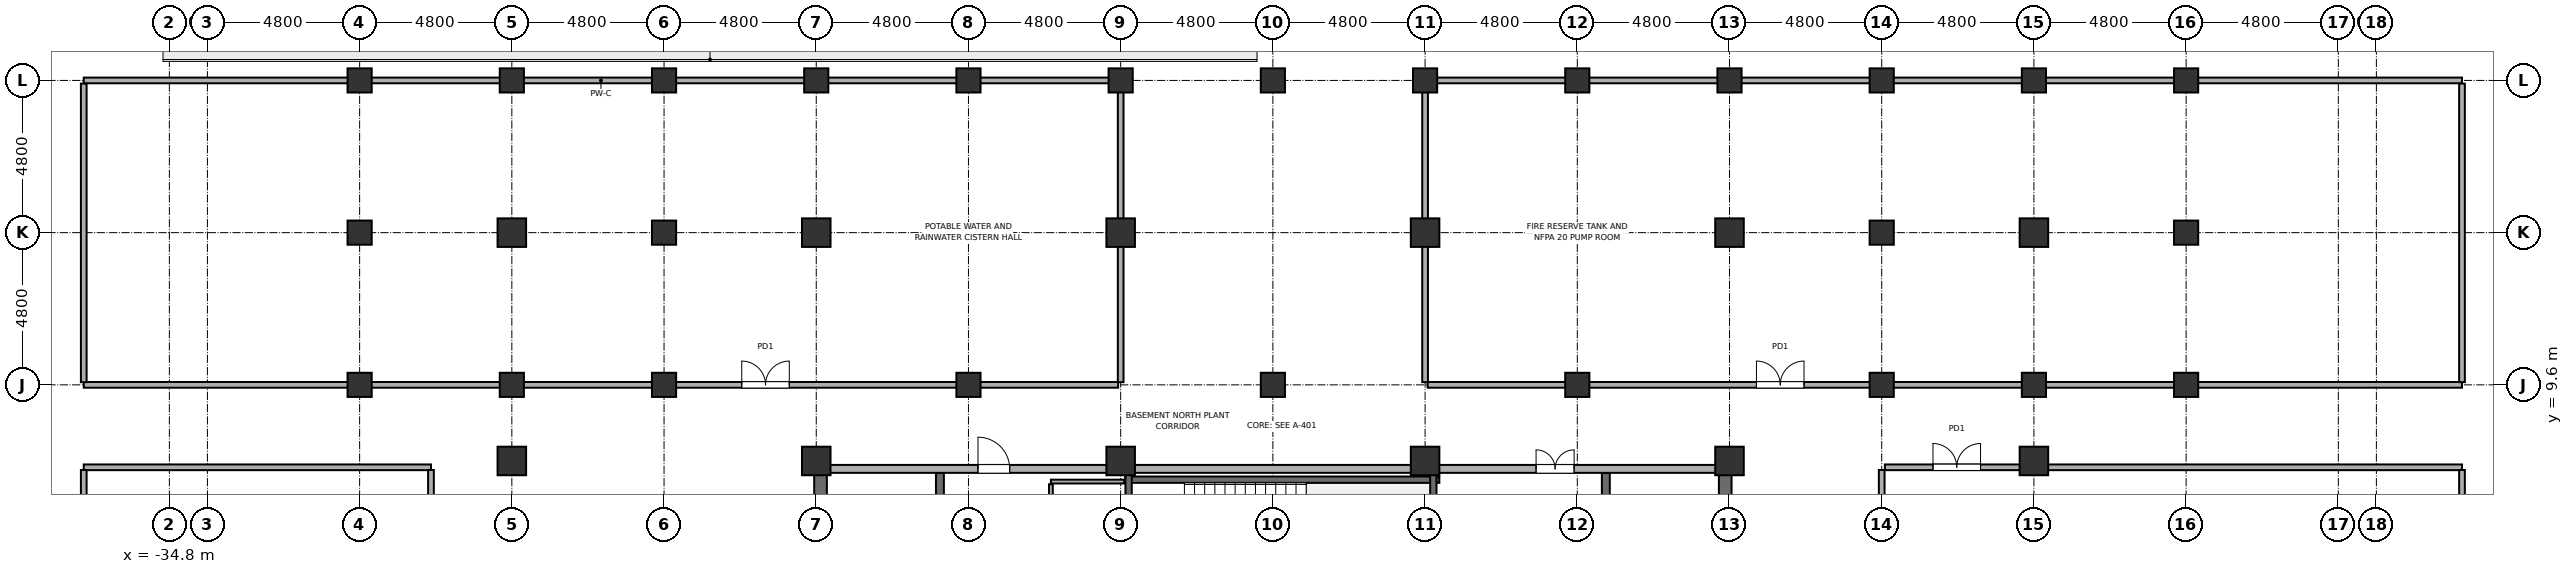
"""IFC4 building model, lengths in metres.
Left out: names, types, materials, properties, quantities, classifications, styles, units other than length and angle.
Written with IfcOpenShell. Run it as: python <this file> out.ifc"""

import sys

from ifc_helpers import new_model, si_unit, direction, frame, frame_2d, origin, origin_2d, place, context, subcontext, project, spatial, rectangle, hollow_rectangle, hollow_circle, extrude, element, fill, save


model = new_model("IFC4")
c1 = context("Model", 3, precision=1e-05, world=origin(), true_north=direction((0.0, 1.0)))
c2 = subcontext(c1, "Body", "Model", "MODEL_VIEW")
j1 = project(units=[si_unit("LENGTHUNIT", "METRE"), si_unit("PLANEANGLEUNIT", "RADIAN")], contexts=[c1])
p1 = place(None, origin())
s1 = spatial("IfcSite", under=j1, at=p1, CompositionType="ELEMENT")
p2 = place(p1, origin())
s2 = spatial("IfcBuilding", under=s1, at=p2, CompositionType="ELEMENT")
p3 = place(p2, frame((0.0, 0.0, -10.2)))
s3 = spatial("IfcBuildingStorey", under=s2, at=p3, CompositionType="ELEMENT", Elevation=-10.2)
for number, where, z_axis, x_axis in (
    (1, (-28.8, 9.6, -0.25), (0.0, 0.0, 1.0), (1.0, 0.0, 0.0)),
    (2, (-28.8, 14.4, -0.25), (0.0, 0.0, 1.0), (1.0, 0.0, 0.0)),
    (3, (-28.8, 19.2, -0.25), (0.0, 0.0, 1.0), (1.0, 0.0, 0.0)),
):
    element("IfcColumn", number, at=place(p3, frame(where, z_axis=z_axis, x_axis=x_axis)), inside=s3, PredefinedType="COLUMN", context=c2, shape_type="SweptSolid", body=[
        extrude(hollow_circle(Radius=0.381, WallThickness=0.032, at=origin_2d()), origin(), (0.0, 0.0, 1.0), 5.05),
    ])
p4 = place(p3, frame((-24.0, 7.2, -0.25), z_axis=(0.0, 0.0, 1.0), x_axis=(1.0, 0.0, 0.0)))
e4 = element("IfcColumn", 4, at=p4, inside=s3, PredefinedType="COLUMN", context=c2, shape_type="SweptSolid", body=[
    extrude(hollow_rectangle(XDim=0.9, YDim=0.9, WallThickness=0.04, at=origin_2d()), origin(), (0.0, 0.0, 1.0), 5.05),
])
p5 = place(p3, frame((-24.0, 9.6, -0.25), z_axis=(0.0, 0.0, 1.0), x_axis=(1.0, 0.0, 0.0)))
e5 = element("IfcColumn", 5, at=p5, inside=s3, PredefinedType="COLUMN", context=c2, shape_type="SweptSolid", body=[
    extrude(hollow_circle(Radius=0.381, WallThickness=0.032, at=origin_2d()), origin(), (0.0, 0.0, 1.0), 5.05),
])
p6 = place(p3, frame((-24.0, 14.4, -0.25), z_axis=(0.0, 0.0, 1.0), x_axis=(1.0, 0.0, 0.0)))
e6 = element("IfcColumn", 6, at=p6, inside=s3, PredefinedType="COLUMN", context=c2, shape_type="SweptSolid", body=[
    extrude(hollow_rectangle(XDim=0.9, YDim=0.9, WallThickness=0.04, at=origin_2d()), origin(), (0.0, 0.0, 1.0), 5.05),
])
for number, where, z_axis, x_axis in (
    (7, (-24.0, 19.2, -0.25), (0.0, 0.0, 1.0), (1.0, 0.0, 0.0)),
    (8, (-19.2, 9.6, -0.25), (0.0, 0.0, 1.0), (1.0, 0.0, 0.0)),
    (9, (-19.2, 14.4, -0.25), (0.0, 0.0, 1.0), (1.0, 0.0, 0.0)),
    (10, (-19.2, 19.2, -0.25), (0.0, 0.0, 1.0), (1.0, 0.0, 0.0)),
):
    element("IfcColumn", number, at=place(p3, frame(where, z_axis=z_axis, x_axis=x_axis)), inside=s3, PredefinedType="COLUMN", context=c2, shape_type="SweptSolid", body=[
        extrude(hollow_circle(Radius=0.381, WallThickness=0.032, at=origin_2d()), origin(), (0.0, 0.0, 1.0), 5.05),
    ])
for number, where, z_axis, x_axis in (
    (11, (-14.4, 7.2, -0.25), (0.0, 0.0, 1.0), (1.0, 0.0, 0.0)),
    (12, (-14.4, 14.4, -0.25), (0.0, 0.0, 1.0), (1.0, 0.0, 0.0)),
):
    element("IfcColumn", number, at=place(p3, frame(where, z_axis=z_axis, x_axis=x_axis)), inside=s3, PredefinedType="COLUMN", context=c2, shape_type="SweptSolid", body=[
        extrude(hollow_rectangle(XDim=0.9, YDim=0.9, WallThickness=0.04, at=origin_2d()), origin(), (0.0, 0.0, 1.0), 5.05),
    ])
for number, where, z_axis, x_axis in (
    (13, (-14.4, 19.2, -0.25), (0.0, 0.0, 1.0), (1.0, 0.0, 0.0)),
    (14, (-9.6, 9.6, -0.25), (0.0, 0.0, 1.0), (1.0, 0.0, 0.0)),
    (15, (-9.6, 19.2, -0.25), (0.0, 0.0, 1.0), (1.0, 0.0, 0.0)),
):
    element("IfcColumn", number, at=place(p3, frame(where, z_axis=z_axis, x_axis=x_axis)), inside=s3, PredefinedType="COLUMN", context=c2, shape_type="SweptSolid", body=[
        extrude(hollow_circle(Radius=0.381, WallThickness=0.032, at=origin_2d()), origin(), (0.0, 0.0, 1.0), 5.05),
    ])
for number, where, z_axis, x_axis in (
    (16, (-4.8, 7.2, -0.25), (0.0, 0.0, 1.0), (1.0, 0.0, 0.0)),
    (17, (-4.8, 14.4, -0.25), (0.0, 0.0, 1.0), (1.0, 0.0, 0.0)),
):
    element("IfcColumn", number, at=place(p3, frame(where, z_axis=z_axis, x_axis=x_axis)), inside=s3, PredefinedType="COLUMN", context=c2, shape_type="SweptSolid", body=[
        extrude(hollow_rectangle(XDim=0.9, YDim=0.9, WallThickness=0.04, at=origin_2d()), origin(), (0.0, 0.0, 1.0), 5.05),
    ])
for number, where, z_axis, x_axis in (
    (18, (-4.8, 19.2, -0.25), (0.0, 0.0, 1.0), (1.0, 0.0, 0.0)),
    (19, (0.0, 9.6, -0.25), (0.0, 0.0, 1.0), (1.0, 0.0, 0.0)),
    (20, (0.0, 19.2, -0.25), (0.0, 0.0, 1.0), (1.0, 0.0, 0.0)),
):
    element("IfcColumn", number, at=place(p3, frame(where, z_axis=z_axis, x_axis=x_axis)), inside=s3, PredefinedType="COLUMN", context=c2, shape_type="SweptSolid", body=[
        extrude(hollow_circle(Radius=0.381, WallThickness=0.032, at=origin_2d()), origin(), (0.0, 0.0, 1.0), 5.05),
    ])
for number, where, z_axis, x_axis in (
    (21, (4.8, 7.2, -0.25), (0.0, 0.0, 1.0), (1.0, 0.0, 0.0)),
    (22, (4.8, 14.4, -0.25), (0.0, 0.0, 1.0), (1.0, 0.0, 0.0)),
):
    element("IfcColumn", number, at=place(p3, frame(where, z_axis=z_axis, x_axis=x_axis)), inside=s3, PredefinedType="COLUMN", context=c2, shape_type="SweptSolid", body=[
        extrude(hollow_rectangle(XDim=0.9, YDim=0.9, WallThickness=0.04, at=origin_2d()), origin(), (0.0, 0.0, 1.0), 5.05),
    ])
for number, where, z_axis, x_axis in (
    (23, (4.8, 19.2, -0.25), (0.0, 0.0, 1.0), (1.0, 0.0, 0.0)),
    (24, (9.6, 9.6, -0.25), (0.0, 0.0, 1.0), (1.0, 0.0, 0.0)),
    (25, (9.6, 19.2, -0.25), (0.0, 0.0, 1.0), (1.0, 0.0, 0.0)),
):
    element("IfcColumn", number, at=place(p3, frame(where, z_axis=z_axis, x_axis=x_axis)), inside=s3, PredefinedType="COLUMN", context=c2, shape_type="SweptSolid", body=[
        extrude(hollow_circle(Radius=0.381, WallThickness=0.032, at=origin_2d()), origin(), (0.0, 0.0, 1.0), 5.05),
    ])
for number, where, z_axis, x_axis in (
    (26, (14.4, 7.2, -0.25), (0.0, 0.0, 1.0), (1.0, 0.0, 0.0)),
    (27, (14.4, 14.4, -0.25), (0.0, 0.0, 1.0), (1.0, 0.0, 0.0)),
):
    element("IfcColumn", number, at=place(p3, frame(where, z_axis=z_axis, x_axis=x_axis)), inside=s3, PredefinedType="COLUMN", context=c2, shape_type="SweptSolid", body=[
        extrude(hollow_rectangle(XDim=0.9, YDim=0.9, WallThickness=0.04, at=origin_2d()), origin(), (0.0, 0.0, 1.0), 5.05),
    ])
for number, where, z_axis, x_axis in (
    (28, (14.4, 19.2, -0.25), (0.0, 0.0, 1.0), (1.0, 0.0, 0.0)),
    (29, (19.2, 9.6, -0.25), (0.0, 0.0, 1.0), (1.0, 0.0, 0.0)),
    (30, (19.2, 14.4, -0.25), (0.0, 0.0, 1.0), (1.0, 0.0, 0.0)),
    (31, (19.2, 19.2, -0.25), (0.0, 0.0, 1.0), (1.0, 0.0, 0.0)),
):
    element("IfcColumn", number, at=place(p3, frame(where, z_axis=z_axis, x_axis=x_axis)), inside=s3, PredefinedType="COLUMN", context=c2, shape_type="SweptSolid", body=[
        extrude(hollow_circle(Radius=0.381, WallThickness=0.032, at=origin_2d()), origin(), (0.0, 0.0, 1.0), 5.05),
    ])
p7 = place(p3, frame((24.0, 7.2, -0.25), z_axis=(0.0, 0.0, 1.0), x_axis=(1.0, 0.0, 0.0)))
e32 = element("IfcColumn", 32, at=p7, inside=s3, PredefinedType="COLUMN", context=c2, shape_type="SweptSolid", body=[
    extrude(hollow_rectangle(XDim=0.9, YDim=0.9, WallThickness=0.04, at=origin_2d()), origin(), (0.0, 0.0, 1.0), 5.05),
])
p8 = place(p3, frame((24.0, 9.6, -0.25), z_axis=(0.0, 0.0, 1.0), x_axis=(1.0, 0.0, 0.0)))
e33 = element("IfcColumn", 33, at=p8, inside=s3, PredefinedType="COLUMN", context=c2, shape_type="SweptSolid", body=[
    extrude(hollow_circle(Radius=0.381, WallThickness=0.032, at=origin_2d()), origin(), (0.0, 0.0, 1.0), 5.05),
])
p9 = place(p3, frame((24.0, 14.4, -0.25), z_axis=(0.0, 0.0, 1.0), x_axis=(1.0, 0.0, 0.0)))
e34 = element("IfcColumn", 34, at=p9, inside=s3, PredefinedType="COLUMN", context=c2, shape_type="SweptSolid", body=[
    extrude(hollow_rectangle(XDim=0.9, YDim=0.9, WallThickness=0.04, at=origin_2d()), origin(), (0.0, 0.0, 1.0), 5.05),
])
for number, where, z_axis, x_axis in (
    (35, (24.0, 19.2, -0.25), (0.0, 0.0, 1.0), (1.0, 0.0, 0.0)),
    (36, (28.8, 9.6, -0.25), (0.0, 0.0, 1.0), (1.0, 0.0, 0.0)),
    (37, (28.8, 14.4, -0.25), (0.0, 0.0, 1.0), (1.0, 0.0, 0.0)),
    (38, (28.8, 19.2, -0.25), (0.0, 0.0, 1.0), (1.0, 0.0, 0.0)),
):
    element("IfcColumn", number, at=place(p3, frame(where, z_axis=z_axis, x_axis=x_axis)), inside=s3, PredefinedType="COLUMN", context=c2, shape_type="SweptSolid", body=[
        extrude(hollow_circle(Radius=0.381, WallThickness=0.032, at=origin_2d()), origin(), (0.0, 0.0, 1.0), 5.05),
    ])
for number, where, z_axis, x_axis in (
    (39, (-14.265, -7.2, -0.25), (0.0, 0.0, 1.0), (0.0, 1.0, 0.0)),
    (40, (14.265, -7.2, -0.25), (0.0, 0.0, 1.0), (0.0, 1.0, 0.0)),
):
    element("IfcWall", number, at=place(p3, frame(where, z_axis=z_axis, x_axis=x_axis)), inside=s3, PredefinedType="SHEAR", context=c2, shape_type="SweptSolid", body=[
        extrude(rectangle(XDim=14.4, YDim=0.4, at=frame_2d((7.2, 0.0))), origin(), (0.0, 0.0, 1.0), 4.8),
    ])
p10 = place(p3, frame((-14.2, 6.95, 0.0), z_axis=(0.0, 0.0, 1.0), x_axis=(1.0, 0.0, 0.0)))
e41 = element("IfcWall", 41, at=p10, inside=s3, PredefinedType="SOLIDWALL", context=c2, shape_type="SweptSolid", body=[
    extrude(rectangle(XDim=9.4, YDim=0.25, at=frame_2d((4.7, 0.0))), origin(), (0.0, 0.0, 1.0), 3.55),
])
p11 = place(p10, frame((4.9, 0.0, 0.0)))
e42 = element("IfcOpeningElement", 42, at=p11, cuts=e41, PredefinedType="OPENING", context=c2, shape_type="SweptSolid", body=[
    extrude(rectangle(XDim=1.0, YDim=2.15, at=frame_2d((0.5, 1.075))), frame((0.0, 0.14, 0.0), z_axis=(0.0, -1.0, 0.0), x_axis=(1.0, 0.0, 0.0)), (0.0, 0.0, 1.0), 0.28),
])
p12 = place(p3, frame((-4.6, 6.95, 0.0), z_axis=(0.0, 0.0, 1.0), x_axis=(1.0, 0.0, 0.0)))
e43 = element("IfcWall", 43, at=p12, inside=s3, PredefinedType="SOLIDWALL", context=c2, shape_type="SweptSolid", body=[
    extrude(rectangle(XDim=9.2, YDim=0.25, at=frame_2d((4.6, 0.0))), origin(), (0.0, 0.0, 1.0), 3.55),
])
p13 = place(p3, frame((4.8, 6.95, 0.0), z_axis=(0.0, 0.0, 1.0), x_axis=(1.0, 0.0, 0.0)))
e44 = element("IfcWall", 44, at=p13, inside=s3, PredefinedType="SOLIDWALL", context=c2, shape_type="SweptSolid", body=[
    extrude(rectangle(XDim=9.4, YDim=0.25, at=frame_2d((4.7, 0.0))), origin(), (0.0, 0.0, 1.0), 3.55),
])
p14 = place(p13, frame((3.5, 0.0, 0.0)))
e45 = element("IfcOpeningElement", 45, at=p14, cuts=e44, PredefinedType="OPENING", context=c2, shape_type="SweptSolid", body=[
    extrude(rectangle(XDim=1.2, YDim=2.2, at=frame_2d((0.6, 1.1))), frame((0.0, 0.14, 0.0), z_axis=(0.0, -1.0, 0.0), x_axis=(1.0, 0.0, 0.0)), (0.0, 0.0, 1.0), 0.28),
])
p15 = place(p3, frame((-10.5, -6.82, -0.25), z_axis=(0.0, 0.0, 1.0), x_axis=(0.0, 1.0, 0.0)))
e46 = element("IfcWall", 46, at=p15, inside=s3, PredefinedType="SOLIDWALL", context=c2, shape_type="SweptSolid", body=[
    extrude(rectangle(XDim=13.64, YDim=0.25, at=frame_2d((6.82, 0.0))), origin(), (0.0, 0.0, 1.0), 4.8),
])
p16 = place(p15, frame((2.32, 0.0, 0.25)))
e47 = element("IfcOpeningElement", 47, at=p16, cuts=e46, PredefinedType="OPENING", context=c2, shape_type="SweptSolid", body=[
    extrude(rectangle(XDim=0.95, YDim=2.15, at=frame_2d((0.475, 1.075))), frame((0.0, 0.14, 0.0), z_axis=(0.0, -1.0, 0.0), x_axis=(1.0, 0.0, 0.0)), (0.0, 0.0, 1.0), 0.28),
])
p17 = place(p3, frame((10.5, -6.82, -0.25), z_axis=(0.0, 0.0, 1.0), x_axis=(0.0, 1.0, 0.0)))
e48 = element("IfcWall", 48, at=p17, inside=s3, PredefinedType="SOLIDWALL", context=c2, shape_type="SweptSolid", body=[
    extrude(rectangle(XDim=13.64, YDim=0.25, at=frame_2d((6.82, 0.0))), origin(), (0.0, 0.0, 1.0), 4.8),
])
p18 = place(p17, frame((2.32, 0.0, 0.25)))
e49 = element("IfcOpeningElement", 49, at=p18, cuts=e48, PredefinedType="OPENING", context=c2, shape_type="SweptSolid", body=[
    extrude(rectangle(XDim=0.95, YDim=2.15, at=frame_2d((0.475, 1.075))), frame((0.0, 0.14, 0.0), z_axis=(0.0, -1.0, 0.0), x_axis=(1.0, 0.0, 0.0)), (0.0, 0.0, 1.0), 0.28),
])
p19 = place(p3, frame((-4.65, 6.61, -0.25), z_axis=(0.0, 0.0, 1.0), x_axis=(1.0, 0.0, 0.0)))
e50 = element("IfcWall", 50, at=p19, inside=s3, PredefinedType="SOLIDWALL", context=c2, shape_type="SweptSolid", body=[
    extrude(rectangle(XDim=9.9, YDim=0.2, at=frame_2d((4.95, 0.0))), origin(), (0.0, 0.0, 1.0), 4.8),
])
for number, where, z_axis, x_axis in (
    (51, (-4.55, 3.08, -0.25), (0.0, 0.0, 1.0), (0.0, 1.0, 0.0)),
    (52, (5.06, 3.08, -0.25), (0.0, 0.0, 1.0), (0.0, 1.0, 0.0)),
):
    element("IfcWall", number, at=place(p3, frame(where, z_axis=z_axis, x_axis=x_axis)), inside=s3, PredefinedType="SOLIDWALL", context=c2, shape_type="SweptSolid", body=[
        extrude(rectangle(XDim=3.74, YDim=0.2, at=frame_2d((1.87, 0.0))), origin(), (0.0, 0.0, 1.0), 4.8),
    ])
p20 = place(p3, frame((-7.0, 6.55, 0.0), z_axis=(0.0, 0.0, 1.0), x_axis=(1.0, 0.0, 0.0)))
e53 = element("IfcWall", 53, at=p20, inside=s3, PredefinedType="PARTITIONING", context=c2, shape_type="SweptSolid", body=[
    extrude(rectangle(XDim=2.31, YDim=0.12, at=frame_2d((1.155, 0.0))), origin(), (0.0, 0.0, 1.0), 4.55),
])
p21 = place(p3, frame((-37.5, 7.0, 0.0), z_axis=(0.0, 0.0, 1.0), x_axis=(1.0, 0.0, 0.0)))
e54 = element("IfcWall", 54, at=p21, inside=s3, PredefinedType="PARTITIONING", context=c2, shape_type="SweptSolid", body=[
    extrude(rectangle(XDim=10.95, YDim=0.18, at=frame_2d((5.475, 0.0))), origin(), (0.0, 0.0, 1.0), 3.85),
])
p22 = place(p3, frame((19.3, 7.0, 0.0), z_axis=(0.0, 0.0, 1.0), x_axis=(1.0, 0.0, 0.0)))
e55 = element("IfcWall", 55, at=p22, inside=s3, PredefinedType="PARTITIONING", context=c2, shape_type="SweptSolid", body=[
    extrude(rectangle(XDim=18.2, YDim=0.18, at=frame_2d((9.1, 0.0))), origin(), (0.0, 0.0, 1.0), 3.55),
])
p23 = place(p22, frame((1.517, 0.0, 0.0)))
e56 = element("IfcOpeningElement", 56, at=p23, cuts=e55, PredefinedType="OPENING", context=c2, shape_type="SweptSolid", body=[
    extrude(rectangle(XDim=1.5, YDim=2.2, at=frame_2d((0.75, 1.1))), frame((0.0, 0.105, 0.0), z_axis=(0.0, -1.0, 0.0), x_axis=(1.0, 0.0, 0.0)), (0.0, 0.0, 1.0), 0.21),
])
p24 = place(p3, frame((-37.5, 9.6, 0.0), z_axis=(0.0, 0.0, 1.0), x_axis=(1.0, 0.0, 0.0)))
e57 = element("IfcWall", 57, at=p24, inside=s3, PredefinedType="PARTITIONING", context=c2, shape_type="SweptSolid", body=[
    extrude(rectangle(XDim=32.62, YDim=0.18, at=frame_2d((16.31, 0.0))), origin(), (0.0, 0.0, 1.0), 3.55),
])
p25 = place(p24, frame((20.75, 0.0, 0.0)))
e58 = element("IfcOpeningElement", 58, at=p25, cuts=e57, PredefinedType="OPENING", context=c2, shape_type="SweptSolid", body=[
    extrude(rectangle(XDim=1.5, YDim=2.2, at=frame_2d((0.75, 1.1))), frame((0.0, 0.105, 0.0), z_axis=(0.0, -1.0, 0.0), x_axis=(1.0, 0.0, 0.0)), (0.0, 0.0, 1.0), 0.21),
])
p26 = place(p3, frame((4.88, 9.6, 0.0), z_axis=(0.0, 0.0, 1.0), x_axis=(1.0, 0.0, 0.0)))
e59 = element("IfcWall", 59, at=p26, inside=s3, PredefinedType="PARTITIONING", context=c2, shape_type="SweptSolid", body=[
    extrude(rectangle(XDim=32.62, YDim=0.18, at=frame_2d((16.31, 0.0))), origin(), (0.0, 0.0, 1.0), 3.55),
])
p27 = place(p26, frame((10.37, 0.0, 0.0)))
e60 = element("IfcOpeningElement", 60, at=p27, cuts=e59, PredefinedType="OPENING", context=c2, shape_type="SweptSolid", body=[
    extrude(rectangle(XDim=1.5, YDim=2.2, at=frame_2d((0.75, 1.1))), frame((0.0, 0.105, 0.0), z_axis=(0.0, -1.0, 0.0), x_axis=(1.0, 0.0, 0.0)), (0.0, 0.0, 1.0), 0.21),
])
for number, where, z_axis, x_axis in (
    (61, (-37.5, 19.2, 0.0), (0.0, 0.0, 1.0), (1.0, 0.0, 0.0)),
    (62, (4.88, 19.2, 0.0), (0.0, 0.0, 1.0), (1.0, 0.0, 0.0)),
):
    element("IfcWall", number, at=place(p3, frame(where, z_axis=z_axis, x_axis=x_axis)), inside=s3, PredefinedType="PARTITIONING", context=c2, shape_type="SweptSolid", body=[
        extrude(rectangle(XDim=32.62, YDim=0.18, at=frame_2d((16.31, 0.0))), origin(), (0.0, 0.0, 1.0), 3.55),
    ])
p28 = place(p3, frame((-37.5, -6.848, 0.0), z_axis=(0.0, 0.0, 1.0), x_axis=(0.0, 1.0, 0.0)))
e63 = element("IfcWall", 63, at=p28, inside=s3, PredefinedType="PARTITIONING", context=c2, shape_type="SweptSolid", body=[
    extrude(rectangle(XDim=13.763, YDim=0.18, at=frame_2d((6.882, 0.0))), origin(), (0.0, 0.0, 1.0), 4.55),
])
p29 = place(p3, frame((-37.5, 9.685, 0.0), z_axis=(0.0, 0.0, 1.0), x_axis=(0.0, 1.0, 0.0)))
e64 = element("IfcWall", 64, at=p29, inside=s3, PredefinedType="PARTITIONING", context=c2, shape_type="SweptSolid", body=[
    extrude(rectangle(XDim=9.415, YDim=0.18, at=frame_2d((4.708, 0.0))), origin(), (0.0, 0.0, 1.0), 3.55),
])
p30 = place(p3, frame((-26.55, 5.0, 0.0), z_axis=(0.0, 0.0, 1.0), x_axis=(0.0, 1.0, 0.0)))
e65 = element("IfcWall", 65, at=p30, inside=s3, PredefinedType="PARTITIONING", context=c2, shape_type="SweptSolid", body=[
    extrude(rectangle(XDim=1.915, YDim=0.18, at=frame_2d((0.958, 0.0))), origin(), (0.0, 0.0, 1.0), 4.55),
])
p31 = place(p3, frame((-7.0, -3.11, 0.0), z_axis=(0.0, 0.0, 1.0), x_axis=(0.0, 1.0, 0.0)))
e66 = element("IfcWall", 66, at=p31, inside=s3, PredefinedType="PARTITIONING", context=c2, shape_type="SweptSolid", body=[
    extrude(rectangle(XDim=9.575, YDim=0.12, at=frame_2d((4.788, 0.0))), origin(), (0.0, 0.0, 1.0), 4.55),
])
p32 = place(p31, frame((7.16, 0.0, 0.0)))
e67 = element("IfcOpeningElement", 67, at=p32, cuts=e66, PredefinedType="OPENING", context=c2, shape_type="SweptSolid", body=[
    extrude(rectangle(XDim=0.9, YDim=2.1, at=frame_2d((0.45, 1.05))), frame((0.0, 0.075, 0.0), z_axis=(0.0, -1.0, 0.0), x_axis=(1.0, 0.0, 0.0)), (0.0, 0.0, 1.0), 0.15),
])
for number, where, z_axis, x_axis in (
    (68, (-4.8, 9.685, 0.0), (0.0, 0.0, 1.0), (0.0, 1.0, 0.0)),
    (69, (4.8, 9.685, 0.0), (0.0, 0.0, 1.0), (0.0, 1.0, 0.0)),
):
    element("IfcWall", number, at=place(p3, frame(where, z_axis=z_axis, x_axis=x_axis)), inside=s3, PredefinedType="PARTITIONING", context=c2, shape_type="SweptSolid", body=[
        extrude(rectangle(XDim=9.415, YDim=0.18, at=frame_2d((4.708, 0.0))), origin(), (0.0, 0.0, 1.0), 3.55),
    ])
p33 = place(p3, frame((19.2, -6.848, 0.0), z_axis=(0.0, 0.0, 1.0), x_axis=(0.0, 1.0, 0.0)))
e70 = element("IfcWall", 70, at=p33, inside=s3, PredefinedType="PARTITIONING", context=c2, shape_type="SweptSolid", body=[
    extrude(rectangle(XDim=13.763, YDim=0.18, at=frame_2d((6.882, 0.0))), origin(), (0.0, 0.0, 1.0), 3.55),
])
p34 = place(p3, frame((37.5, -6.848, 0.0), z_axis=(0.0, 0.0, 1.0), x_axis=(0.0, 1.0, 0.0)))
e71 = element("IfcWall", 71, at=p34, inside=s3, PredefinedType="PARTITIONING", context=c2, shape_type="SweptSolid", body=[
    extrude(rectangle(XDim=13.763, YDim=0.18, at=frame_2d((6.882, 0.0))), origin(), (0.0, 0.0, 1.0), 4.55),
])
p35 = place(p3, frame((37.5, 9.685, 0.0), z_axis=(0.0, 0.0, 1.0), x_axis=(0.0, 1.0, 0.0)))
e72 = element("IfcWall", 72, at=p35, inside=s3, PredefinedType="PARTITIONING", context=c2, shape_type="SweptSolid", body=[
    extrude(rectangle(XDim=9.415, YDim=0.18, at=frame_2d((4.708, 0.0))), origin(), (0.0, 0.0, 1.0), 3.55),
])
p36 = place(p11, origin())
e73 = element("IfcDoor", 73, at=p36, inside=s3, OperationType="SINGLE_SWING_RIGHT", PredefinedType="DOOR", context=c2, shape_type="SweptSolid", body=[
    extrude(rectangle(XDim=1.0, YDim=2.15, at=frame_2d((0.5, 1.075))), frame((0.0, 0.025, 0.0), z_axis=(0.0, -1.0, 0.0), x_axis=(1.0, 0.0, 0.0)), (0.0, 0.0, 1.0), 0.05),
])
fill(e42, e73)
p37 = place(p14, origin())
e74 = element("IfcDoor", 74, at=p37, inside=s3, OperationType="DOUBLE_DOOR_SINGLE_SWING", PredefinedType="DOOR", context=c2, shape_type="SweptSolid", body=[
    extrude(rectangle(XDim=1.2, YDim=2.2, at=frame_2d((0.6, 1.1))), frame((0.0, 0.025, 0.0), z_axis=(0.0, -1.0, 0.0), x_axis=(1.0, 0.0, 0.0)), (0.0, 0.0, 1.0), 0.05),
])
fill(e45, e74)
p38 = place(p23, origin())
e75 = element("IfcDoor", 75, at=p38, inside=s3, OperationType="DOUBLE_DOOR_SINGLE_SWING", PredefinedType="DOOR", context=c2, shape_type="SweptSolid", body=[
    extrude(rectangle(XDim=1.5, YDim=2.2, at=frame_2d((0.75, 1.1))), frame((0.0, 0.025, 0.0), z_axis=(0.0, -1.0, 0.0), x_axis=(1.0, 0.0, 0.0)), (0.0, 0.0, 1.0), 0.05),
])
fill(e56, e75)
p39 = place(p25, origin())
e76 = element("IfcDoor", 76, at=p39, inside=s3, OperationType="DOUBLE_DOOR_SINGLE_SWING", PredefinedType="DOOR", context=c2, shape_type="SweptSolid", body=[
    extrude(rectangle(XDim=1.5, YDim=2.2, at=frame_2d((0.75, 1.1))), frame((0.0, 0.025, 0.0), z_axis=(0.0, -1.0, 0.0), x_axis=(1.0, 0.0, 0.0)), (0.0, 0.0, 1.0), 0.05),
])
fill(e58, e76)
p40 = place(p27, origin())
e77 = element("IfcDoor", 77, at=p40, inside=s3, OperationType="DOUBLE_DOOR_SINGLE_SWING", PredefinedType="DOOR", context=c2, shape_type="SweptSolid", body=[
    extrude(rectangle(XDim=1.5, YDim=2.2, at=frame_2d((0.75, 1.1))), frame((0.0, 0.025, 0.0), z_axis=(0.0, -1.0, 0.0), x_axis=(1.0, 0.0, 0.0)), (0.0, 0.0, 1.0), 0.05),
])
fill(e60, e77)
save(model, sys.argv[1])
